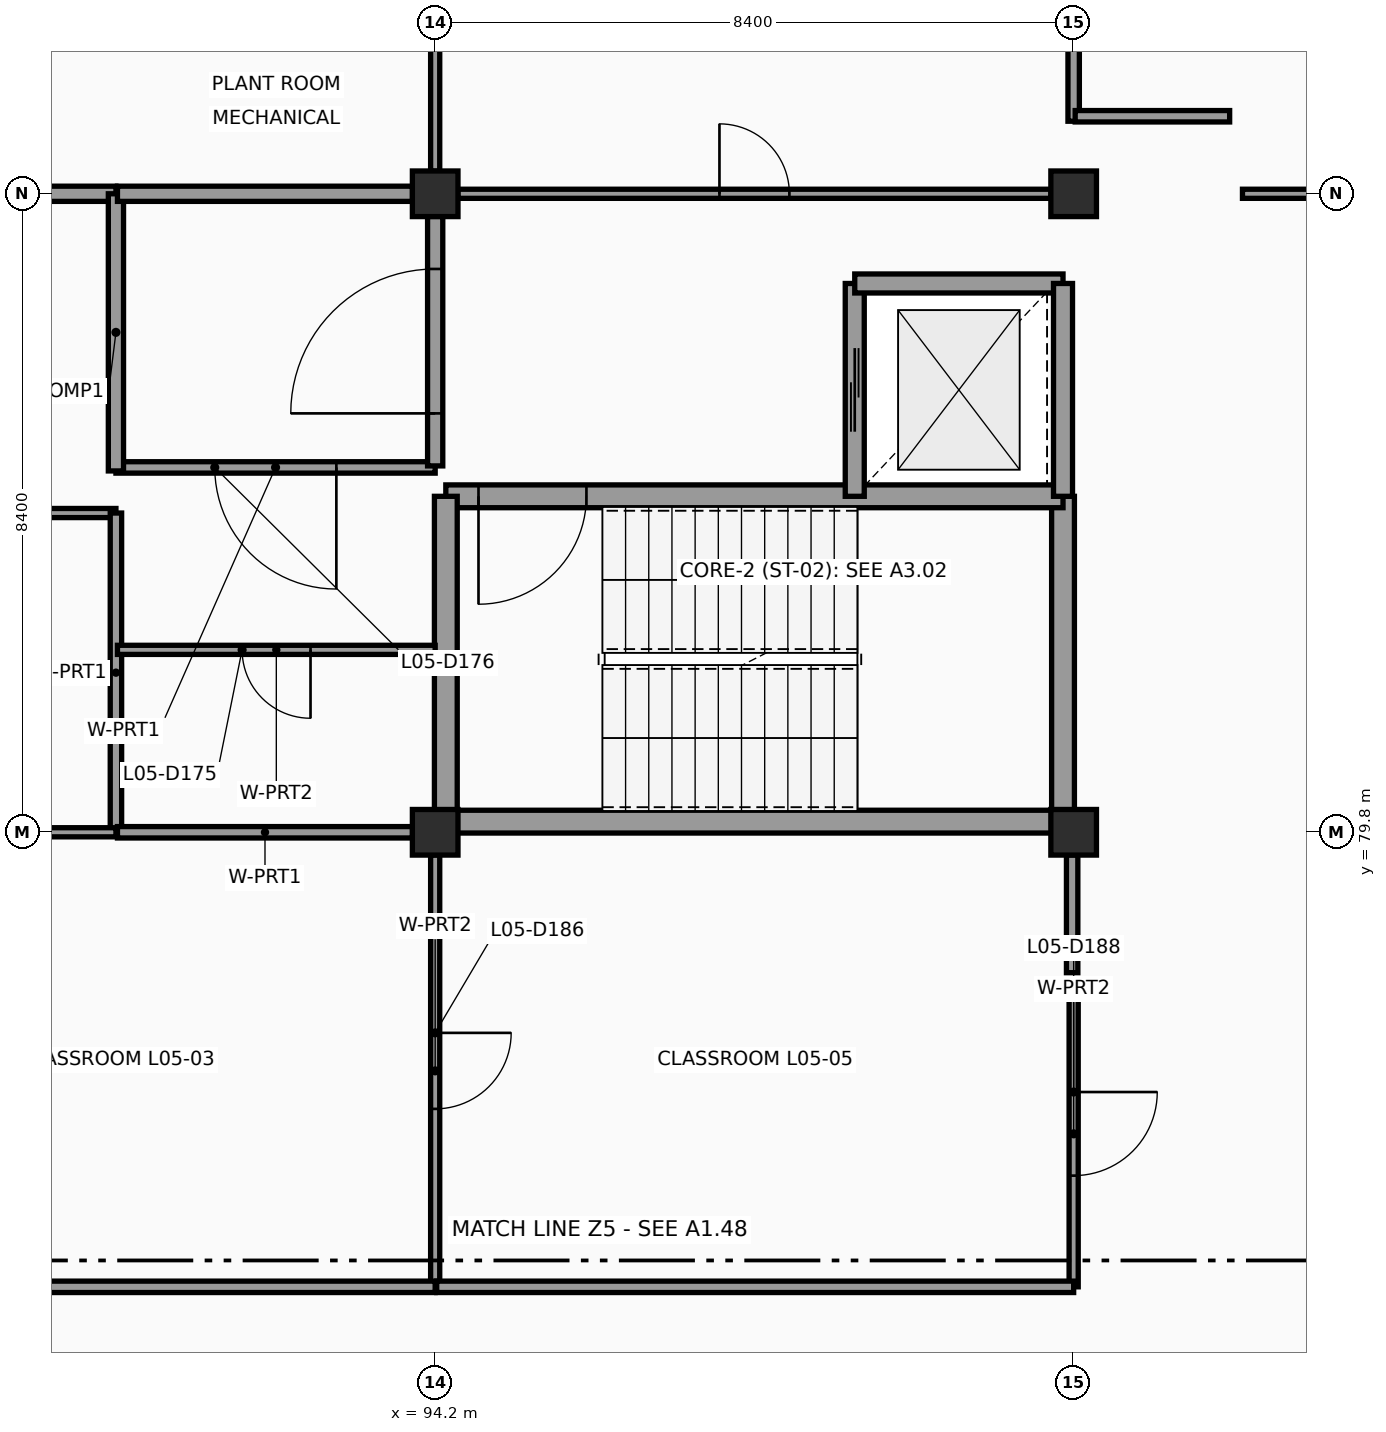
"""IFC4 building model, lengths in metres.
Left out: names, types, materials, properties, quantities, classifications, styles, units other than length and angle.
Written with IfcOpenShell. Run it as: python <this file> out.ifc"""

import sys

from ifc_helpers import new_model, si_unit, direction, frame, frame_2d, origin, origin_2d, place, context, subcontext, project, spatial, rectangle, extrude, element, fill, save


model = new_model("IFC4")
c1 = context("Model", 3, precision=1e-05, world=origin(), true_north=direction((0.0, 1.0)))
c2 = subcontext(c1, "Body", "Model", "MODEL_VIEW")
j1 = project(units=[si_unit("LENGTHUNIT", "METRE"), si_unit("PLANEANGLEUNIT", "RADIAN")], contexts=[c1])
p1 = place(None, origin())
s1 = spatial("IfcSite", under=j1, at=p1, CompositionType="ELEMENT")
p2 = place(p1, origin())
s2 = spatial("IfcBuilding", under=s1, at=p2, CompositionType="ELEMENT")
p3 = place(p2, frame((0.0, 0.0, 18.6)))
s3 = spatial("IfcBuildingStorey", under=s2, at=p3, CompositionType="ELEMENT", Elevation=18.6)
for number, where, z_axis, x_axis in (
    (1, (94.2, 79.8, 0.0), (0.0, 0.0, 1.0), (1.0, 0.0, 0.0)),
    (2, (94.2, 88.2, 0.0), (0.0, 0.0, 1.0), (1.0, 0.0, 0.0)),
    (3, (102.6, 79.8, 0.0), (0.0, 0.0, 1.0), (1.0, 0.0, 0.0)),
    (4, (102.6, 88.2, 0.0), (0.0, 0.0, 1.0), (1.0, 0.0, 0.0)),
):
    element("IfcColumn", number, at=place(p3, frame(where, z_axis=z_axis, x_axis=x_axis)), inside=s3, PredefinedType="COLUMN", context=c2, shape_type="SweptSolid", body=[
        extrude(rectangle(XDim=0.6, YDim=0.6, at=origin_2d()), origin(), (0.0, 0.0, 1.0), 3.6),
    ])
p4 = place(p3, frame((94.34, 79.94, 0.0), z_axis=(0.0, 0.0, 1.0), x_axis=(1.0, 0.0, 0.0)))
e5 = element("IfcWall", 5, at=p4, inside=s3, PredefinedType="SHEAR", context=c2, shape_type="SweptSolid", body=[
    extrude(rectangle(XDim=8.12, YDim=0.3, at=frame_2d((4.06, 0.0))), origin(), (0.0, 0.0, 1.0), 3.6),
])
p5 = place(p3, frame((102.46, 79.94, 0.0), z_axis=(0.0, 0.0, 1.0), x_axis=(0.0, 1.0, 0.0)))
e6 = element("IfcWall", 6, at=p5, inside=s3, PredefinedType="SHEAR", context=c2, shape_type="SweptSolid", body=[
    extrude(rectangle(XDim=4.28, YDim=0.3, at=frame_2d((2.14, 0.0))), origin(), (0.0, 0.0, 1.0), 3.6),
])
p6 = place(p3, frame((102.46, 84.22, 0.0), z_axis=(0.0, 0.0, 1.0), x_axis=(-1.0, 0.0, 0.0)))
e7 = element("IfcWall", 7, at=p6, inside=s3, PredefinedType="SHEAR", context=c2, shape_type="SweptSolid", body=[
    extrude(rectangle(XDim=8.12, YDim=0.3, at=frame_2d((4.06, 0.0))), origin(), (0.0, 0.0, 1.0), 3.6),
])
p7 = place(p6, frame((6.27, 0.0, 0.0)))
e8 = element("IfcOpeningElement", 8, at=p7, cuts=e7, PredefinedType="OPENING", context=c2, shape_type="SweptSolid", body=[
    extrude(rectangle(XDim=1.42, YDim=2.15, at=frame_2d((0.71, 1.075))), frame((0.0, 0.16, 0.0), z_axis=(0.0, -1.0, 0.0), x_axis=(1.0, 0.0, 0.0)), (0.0, 0.0, 1.0), 0.32),
])
p8 = place(p3, frame((94.34, 84.22, 0.0), z_axis=(0.0, 0.0, 1.0), x_axis=(0.0, -1.0, 0.0)))
e9 = element("IfcWall", 9, at=p8, inside=s3, PredefinedType="SHEAR", context=c2, shape_type="SweptSolid", body=[
    extrude(rectangle(XDim=4.28, YDim=0.3, at=frame_2d((2.14, 0.0))), origin(), (0.0, 0.0, 1.0), 3.6),
])
p9 = place(p3, frame((99.72, 87.02, 0.0), z_axis=(0.0, 0.0, 1.0), x_axis=(0.0, -1.0, 0.0)))
e10 = element("IfcWall", 10, at=p9, inside=s3, PredefinedType="SHEAR", context=c2, shape_type="SweptSolid", body=[
    extrude(rectangle(XDim=2.8, YDim=0.25, at=frame_2d((1.4, 0.0))), origin(), (0.0, 0.0, 1.0), 3.6),
])
p10 = place(p9, frame((0.85, 0.0, 0.0)))
e11 = element("IfcOpeningElement", 11, at=p10, cuts=e10, PredefinedType="OPENING", context=c2, shape_type="SweptSolid", body=[
    extrude(rectangle(XDim=1.1, YDim=2.15, at=frame_2d((0.55, 1.075))), frame((0.0, 0.135, 0.0), z_axis=(0.0, -1.0, 0.0), x_axis=(1.0, 0.0, 0.0)), (0.0, 0.0, 1.0), 0.27),
])
p11 = place(p3, frame((102.46, 87.02, 0.0), z_axis=(0.0, 0.0, 1.0), x_axis=(-1.0, 0.0, 0.0)))
e12 = element("IfcWall", 12, at=p11, inside=s3, PredefinedType="SHEAR", context=c2, shape_type="SweptSolid", body=[
    extrude(rectangle(XDim=2.74, YDim=0.25, at=frame_2d((1.37, 0.0))), origin(), (0.0, 0.0, 1.0), 3.6),
])
p12 = place(p3, frame((102.46, 84.22, 0.0), z_axis=(0.0, 0.0, 1.0), x_axis=(0.0, 1.0, 0.0)))
e13 = element("IfcWall", 13, at=p12, inside=s3, PredefinedType="SHEAR", context=c2, shape_type="SweptSolid", body=[
    extrude(rectangle(XDim=2.8, YDim=0.25, at=frame_2d((1.4, 0.0))), origin(), (0.0, 0.0, 1.0), 3.6),
])
p13 = place(p3, frame((85.8, 84.0, 0.0), z_axis=(0.0, 0.0, 1.0), x_axis=(1.0, 0.0, 0.0)))
e14 = element("IfcWall", 14, at=p13, inside=s3, PredefinedType="PARTITIONING", context=c2, shape_type="SweptSolid", body=[
    extrude(rectangle(XDim=4.2, YDim=0.12, at=frame_2d((2.1, 0.0))), origin(), (0.0, 0.0, 1.0), 2.95),
])
p14 = place(p13, frame((1.65, 0.0, 0.0)))
e15 = element("IfcOpeningElement", 15, at=p14, cuts=e14, PredefinedType="OPENING", context=c2, shape_type="SweptSolid", body=[
    extrude(rectangle(XDim=0.9, YDim=2.1, at=frame_2d((0.45, 1.05))), frame((0.0, 0.07, 0.0), z_axis=(0.0, -1.0, 0.0), x_axis=(1.0, 0.0, 0.0)), (0.0, 0.0, 1.0), 0.14),
])
p15 = place(p3, frame((90.0, 84.0, 0.0), z_axis=(0.0, 0.0, 1.0), x_axis=(0.0, -1.0, 0.0)))
e16 = element("IfcWall", 16, at=p15, inside=s3, PredefinedType="PARTITIONING", context=c2, shape_type="SweptSolid", body=[
    extrude(rectangle(XDim=4.2, YDim=0.15, at=frame_2d((2.1, 0.0))), origin(), (0.0, 0.0, 1.0), 2.55),
])
p16 = place(p3, frame((90.0, 79.8, 0.0), z_axis=(0.0, 0.0, 1.0), x_axis=(-1.0, 0.0, 0.0)))
e17 = element("IfcWall", 17, at=p16, inside=s3, PredefinedType="PARTITIONING", context=c2, shape_type="SweptSolid", body=[
    extrude(rectangle(XDim=3.902, YDim=0.12, at=frame_2d((1.951, 0.0))), origin(), (0.0, 0.0, 1.0), 2.55),
])
p17 = place(p3, frame((93.902, 79.8, 0.0), z_axis=(0.0, 0.0, 1.0), x_axis=(-1.0, 0.0, 0.0)))
e18 = element("IfcWall", 18, at=p17, inside=s3, PredefinedType="PARTITIONING", context=c2, shape_type="SweptSolid", body=[
    extrude(rectangle(XDim=3.882, YDim=0.15, at=frame_2d((1.941, 0.0))), origin(), (0.0, 0.0, 1.0), 2.55),
])
p18 = place(p3, frame((90.02, 82.2, 0.0), z_axis=(0.0, 0.0, 1.0), x_axis=(1.0, 0.0, 0.0)))
e19 = element("IfcWall", 19, at=p18, inside=s3, PredefinedType="PARTITIONING", context=c2, shape_type="SweptSolid", body=[
    extrude(rectangle(XDim=4.18, YDim=0.12, at=frame_2d((2.09, 0.0))), origin(), (0.0, 0.0, 1.0), 2.99),
])
p19 = place(p18, frame((1.64, 0.0, 0.0)))
e20 = element("IfcOpeningElement", 20, at=p19, cuts=e19, PredefinedType="OPENING", context=c2, shape_type="SweptSolid", body=[
    extrude(rectangle(XDim=0.9, YDim=2.1, at=frame_2d((0.45, 1.05))), frame((0.0, 0.07, 0.0), z_axis=(0.0, -1.0, 0.0), x_axis=(1.0, 0.0, 0.0)), (0.0, 0.0, 1.0), 0.14),
])
p20 = place(p3, frame((90.0, 84.6, 0.0), z_axis=(0.0, 0.0, 1.0), x_axis=(1.0, 0.0, 0.0)))
e21 = element("IfcWall", 21, at=p20, inside=s3, PredefinedType="PARTITIONING", context=c2, shape_type="SweptSolid", body=[
    extrude(rectangle(XDim=4.2, YDim=0.15, at=frame_2d((2.1, 0.0))), origin(), (0.0, 0.0, 1.0), 2.99),
])
p21 = place(p20, frame((1.3, 0.0, 0.0)))
e22 = element("IfcOpeningElement", 22, at=p21, cuts=e21, PredefinedType="OPENING", context=c2, shape_type="SweptSolid", body=[
    extrude(rectangle(XDim=1.6, YDim=2.2, at=frame_2d((0.8, 1.1))), frame((0.0, 0.085, 0.0), z_axis=(0.0, -1.0, 0.0), x_axis=(1.0, 0.0, 0.0)), (0.0, 0.0, 1.0), 0.17),
])
p22 = place(p3, frame((86.098, 88.2, 0.0), z_axis=(0.0, 0.0, 1.0), x_axis=(1.0, 0.0, 0.0)))
e23 = element("IfcWall", 23, at=p22, inside=s3, PredefinedType="PARTITIONING", context=c2, shape_type="SweptSolid", body=[
    extrude(rectangle(XDim=3.902, YDim=0.2, at=frame_2d((1.951, 0.0))), origin(), (0.0, 0.0, 1.0), 2.9),
])
p23 = place(p22, frame((1.051, 0.0, 0.0)))
e24 = element("IfcOpeningElement", 24, at=p23, cuts=e23, PredefinedType="OPENING", context=c2, shape_type="SweptSolid", body=[
    extrude(rectangle(XDim=1.8, YDim=2.25, at=frame_2d((0.9, 1.125))), frame((0.0, 0.11, 0.0), z_axis=(0.0, -1.0, 0.0), x_axis=(1.0, 0.0, 0.0)), (0.0, 0.0, 1.0), 0.22),
])
p24 = place(p3, frame((90.0, 88.2, 0.0), z_axis=(0.0, 0.0, 1.0), x_axis=(0.0, -1.0, 0.0)))
e25 = element("IfcWall", 25, at=p24, inside=s3, PredefinedType="PARTITIONING", context=c2, shape_type="SweptSolid", body=[
    extrude(rectangle(XDim=3.646, YDim=0.2, at=frame_2d((1.823, 0.0))), origin(), (0.0, 0.0, 1.0), 2.9),
])
p25 = place(p3, frame((90.02, 88.2, 0.0), z_axis=(0.0, 0.0, 1.0), x_axis=(1.0, 0.0, 0.0)))
e26 = element("IfcWall", 26, at=p25, inside=s3, PredefinedType="PARTITIONING", context=c2, shape_type="SweptSolid", body=[
    extrude(rectangle(XDim=3.882, YDim=0.2, at=frame_2d((1.941, 0.0))), origin(), (0.0, 0.0, 1.0), 2.9),
])
p26 = place(p3, frame((94.2, 87.902, 0.0), z_axis=(0.0, 0.0, 1.0), x_axis=(0.0, -1.0, 0.0)))
e27 = element("IfcWall", 27, at=p26, inside=s3, PredefinedType="PARTITIONING", context=c2, shape_type="SweptSolid", body=[
    extrude(rectangle(XDim=3.282, YDim=0.2, at=frame_2d((1.641, 0.0))), origin(), (0.0, 0.0, 1.0), 2.99),
])
p27 = place(p26, frame((0.691, 0.0, 0.0)))
e28 = element("IfcOpeningElement", 28, at=p27, cuts=e27, PredefinedType="OPENING", context=c2, shape_type="SweptSolid", body=[
    extrude(rectangle(XDim=1.9, YDim=2.3, at=frame_2d((0.95, 1.15))), frame((0.0, 0.11, 0.0), z_axis=(0.0, -1.0, 0.0), x_axis=(1.0, 0.0, 0.0)), (0.0, 0.0, 1.0), 0.22),
])
p28 = place(p3, frame((94.2, 79.502, 0.0), z_axis=(0.0, 0.0, 1.0), x_axis=(0.0, -1.0, 0.0)))
e29 = element("IfcWall", 29, at=p28, inside=s3, PredefinedType="PARTITIONING", context=c2, shape_type="SweptSolid", body=[
    extrude(rectangle(XDim=5.682, YDim=0.12, at=frame_2d((2.841, 0.0))), origin(), (0.0, 0.0, 1.0), 2.92),
])
p29 = place(p28, frame((2.341, 0.0, 0.0)))
e30 = element("IfcOpeningElement", 30, at=p29, cuts=e29, PredefinedType="OPENING", context=c2, shape_type="SweptSolid", body=[
    extrude(rectangle(XDim=1.0, YDim=2.1, at=frame_2d((0.5, 1.05))), frame((0.0, 0.07, 0.0), z_axis=(0.0, -1.0, 0.0), x_axis=(1.0, 0.0, 0.0)), (0.0, 0.0, 1.0), 0.14),
])
p30 = place(p3, frame((94.2, 73.82, 0.0), z_axis=(0.0, 0.0, 1.0), x_axis=(-1.0, 0.0, 0.0)))
e31 = element("IfcWall", 31, at=p30, inside=s3, PredefinedType="PARTITIONING", context=c2, shape_type="SweptSolid", body=[
    extrude(rectangle(XDim=8.38, YDim=0.15, at=frame_2d((4.19, 0.0))), origin(), (0.0, 0.0, 1.0), 2.88),
])
p31 = place(p3, frame((94.2, 96.302, 0.0), z_axis=(0.0, 0.0, 1.0), x_axis=(0.0, -1.0, 0.0)))
e32 = element("IfcWall", 32, at=p31, inside=s3, PredefinedType="PARTITIONING", context=c2, shape_type="SweptSolid", body=[
    extrude(rectangle(XDim=7.804, YDim=0.12, at=frame_2d((3.902, 0.0))), origin(), (0.0, 0.0, 1.0), 2.99),
])
p32 = place(p31, frame((3.412, 0.0, 0.0)))
e33 = element("IfcOpeningElement", 33, at=p32, cuts=e32, PredefinedType="OPENING", context=c2, shape_type="SweptSolid", body=[
    extrude(rectangle(XDim=0.98, YDim=2.12, at=frame_2d((0.49, 1.06))), frame((0.0, 0.07, 0.0), z_axis=(0.0, -1.0, 0.0), x_axis=(1.0, 0.0, 0.0)), (0.0, 0.0, 1.0), 0.14),
])
p33 = place(p3, frame((102.58, 79.502, 0.0), z_axis=(0.0, 0.0, 1.0), x_axis=(0.0, -1.0, 0.0)))
e34 = element("IfcWall", 34, at=p33, inside=s3, PredefinedType="PARTITIONING", context=c2, shape_type="SweptSolid", body=[
    extrude(rectangle(XDim=1.549, YDim=0.15, at=frame_2d((0.774, 0.0))), origin(), (0.0, 0.0, 1.0), 2.63),
])
p34 = place(p3, frame((102.6, 77.845, 0.0), z_axis=(0.0, 0.0, 1.0), x_axis=(0.0, -1.0, 0.0)))
e35 = element("IfcWall", 35, at=p34, inside=s3, PredefinedType="PARTITIONING", context=c2, shape_type="SweptSolid", body=[
    extrude(rectangle(XDim=4.025, YDim=0.12, at=frame_2d((2.013, 0.0))), origin(), (0.0, 0.0, 1.0), 2.63),
])
p35 = place(p34, frame((1.463, 0.0, 0.0)))
e36 = element("IfcOpeningElement", 36, at=p35, cuts=e35, PredefinedType="OPENING", context=c2, shape_type="SweptSolid", body=[
    extrude(rectangle(XDim=1.1, YDim=2.1, at=frame_2d((0.55, 1.05))), frame((0.0, 0.07, 0.0), z_axis=(0.0, -1.0, 0.0), x_axis=(1.0, 0.0, 0.0)), (0.0, 0.0, 1.0), 0.14),
])
p36 = place(p3, frame((102.6, 73.82, 0.0), z_axis=(0.0, 0.0, 1.0), x_axis=(-1.0, 0.0, 0.0)))
e37 = element("IfcWall", 37, at=p36, inside=s3, PredefinedType="PARTITIONING", context=c2, shape_type="SweptSolid", body=[
    extrude(rectangle(XDim=8.38, YDim=0.15, at=frame_2d((4.19, 0.0))), origin(), (0.0, 0.0, 1.0), 2.63),
])
p37 = place(p3, frame((102.302, 88.2, 0.0), z_axis=(0.0, 0.0, 1.0), x_axis=(-1.0, 0.0, 0.0)))
e38 = element("IfcWall", 38, at=p37, inside=s3, PredefinedType="PARTITIONING", context=c2, shape_type="SweptSolid", body=[
    extrude(rectangle(XDim=7.804, YDim=0.12, at=frame_2d((3.902, 0.0))), origin(), (0.0, 0.0, 1.0), 2.9),
])
p38 = place(p37, frame((3.442, 0.0, 0.0)))
e39 = element("IfcOpeningElement", 39, at=p38, cuts=e38, PredefinedType="OPENING", context=c2, shape_type="SweptSolid", body=[
    extrude(rectangle(XDim=0.92, YDim=2.1, at=frame_2d((0.46, 1.05))), frame((0.0, 0.07, 0.0), z_axis=(0.0, -1.0, 0.0), x_axis=(1.0, 0.0, 0.0)), (0.0, 0.0, 1.0), 0.14),
])
p39 = place(p3, frame((102.6, 96.302, 0.0), z_axis=(0.0, 0.0, 1.0), x_axis=(0.0, -1.0, 0.0)))
e40 = element("IfcWall", 40, at=p39, inside=s3, PredefinedType="PARTITIONING", context=c2, shape_type="SweptSolid", body=[
    extrude(rectangle(XDim=7.147, YDim=0.15, at=frame_2d((3.574, 0.0))), origin(), (0.0, 0.0, 1.0), 2.7),
])
p40 = place(p3, frame((109.552, 88.2, 0.0), z_axis=(0.0, 0.0, 1.0), x_axis=(-1.0, 0.0, 0.0)))
e41 = element("IfcWall", 41, at=p40, inside=s3, PredefinedType="PARTITIONING", context=c2, shape_type="SweptSolid", body=[
    extrude(rectangle(XDim=4.731, YDim=0.12, at=frame_2d((2.366, 0.0))), origin(), (0.0, 0.0, 1.0), 3.35),
])
p41 = place(p40, frame((1.666, 0.0, 0.0)))
e42 = element("IfcOpeningElement", 42, at=p41, cuts=e41, PredefinedType="OPENING", context=c2, shape_type="SweptSolid", body=[
    extrude(rectangle(XDim=1.4, YDim=2.2, at=frame_2d((0.7, 1.1))), frame((0.0, 0.07, 0.0), z_axis=(0.0, -1.0, 0.0), x_axis=(1.0, 0.0, 0.0)), (0.0, 0.0, 1.0), 0.14),
])
p42 = place(p3, frame((104.652, 89.22, 0.0), z_axis=(0.0, 0.0, 1.0), x_axis=(-1.0, 0.0, 0.0)))
e43 = element("IfcWall", 43, at=p42, inside=s3, PredefinedType="PARTITIONING", context=c2, shape_type="SweptSolid", body=[
    extrude(rectangle(XDim=2.032, YDim=0.15, at=frame_2d((1.016, 0.0))), origin(), (0.0, 0.0, 1.0), 2.7),
])
p43 = place(p7, frame((1.42, 0.0, 0.0), z_axis=(0.0, 0.0, 1.0), x_axis=(-1.0, 0.0, 0.0)))
e44 = element("IfcDoor", 44, at=p43, inside=s3, OperationType="SINGLE_SWING_RIGHT", PredefinedType="DOOR", context=c2, shape_type="SweptSolid", body=[
    extrude(rectangle(XDim=1.42, YDim=2.15, at=frame_2d((0.71, 1.075))), frame((0.0, 0.025, 0.0), z_axis=(0.0, -1.0, 0.0), x_axis=(1.0, 0.0, 0.0)), (0.0, 0.0, 1.0), 0.05),
])
fill(e8, e44)
p44 = place(p10, origin())
e45 = element("IfcDoor", 45, at=p44, inside=s3, OperationType="DOUBLE_DOOR_SLIDING", PredefinedType="DOOR", context=c2, shape_type="SweptSolid", body=[
    extrude(rectangle(XDim=1.1, YDim=2.15, at=frame_2d((0.55, 1.075))), frame((0.0, 0.025, 0.0), z_axis=(0.0, -1.0, 0.0), x_axis=(1.0, 0.0, 0.0)), (0.0, 0.0, 1.0), 0.05),
])
fill(e11, e45)
p45 = place(p19, origin())
e46 = element("IfcDoor", 46, at=p45, inside=s3, OperationType="SINGLE_SWING_RIGHT", PredefinedType="DOOR", context=c2, shape_type="SweptSolid", body=[
    extrude(rectangle(XDim=0.9, YDim=2.1, at=frame_2d((0.45, 1.05))), frame((0.0, 0.025, 0.0), z_axis=(0.0, -1.0, 0.0), x_axis=(1.0, 0.0, 0.0)), (0.0, 0.0, 1.0), 0.05),
])
fill(e20, e46)
p46 = place(p21, origin())
e47 = element("IfcDoor", 47, at=p46, inside=s3, OperationType="DOUBLE_DOOR_SINGLE_SWING", PredefinedType="DOOR", context=c2, shape_type="SweptSolid", body=[
    extrude(rectangle(XDim=1.6, YDim=2.2, at=frame_2d((0.8, 1.1))), frame((0.0, 0.025, 0.0), z_axis=(0.0, -1.0, 0.0), x_axis=(1.0, 0.0, 0.0)), (0.0, 0.0, 1.0), 0.05),
])
fill(e22, e47)
p47 = place(p27, origin())
e48 = element("IfcDoor", 48, at=p47, inside=s3, OperationType="DOUBLE_DOOR_SINGLE_SWING", PredefinedType="DOOR", context=c2, shape_type="SweptSolid", body=[
    extrude(rectangle(XDim=1.9, YDim=2.3, at=frame_2d((0.95, 1.15))), frame((0.0, 0.025, 0.0), z_axis=(0.0, -1.0, 0.0), x_axis=(1.0, 0.0, 0.0)), (0.0, 0.0, 1.0), 0.05),
])
fill(e28, e48)
p48 = place(p29, origin())
e49 = element("IfcDoor", 49, at=p48, inside=s3, OperationType="SINGLE_SWING_LEFT", PredefinedType="DOOR", context=c2, shape_type="SweptSolid", body=[
    extrude(rectangle(XDim=1.0, YDim=2.1, at=frame_2d((0.5, 1.05))), frame((0.0, 0.025, 0.0), z_axis=(0.0, -1.0, 0.0), x_axis=(1.0, 0.0, 0.0)), (0.0, 0.0, 1.0), 0.05),
])
fill(e30, e49)
p49 = place(p35, origin())
e50 = element("IfcDoor", 50, at=p49, inside=s3, OperationType="SINGLE_SWING_LEFT", PredefinedType="DOOR", context=c2, shape_type="SweptSolid", body=[
    extrude(rectangle(XDim=1.1, YDim=2.1, at=frame_2d((0.55, 1.05))), frame((0.0, 0.025, 0.0), z_axis=(0.0, -1.0, 0.0), x_axis=(1.0, 0.0, 0.0)), (0.0, 0.0, 1.0), 0.05),
])
fill(e36, e50)
p50 = place(p38, origin())
e51 = element("IfcDoor", 51, at=p50, inside=s3, OperationType="SINGLE_SWING_RIGHT", PredefinedType="DOOR", context=c2, shape_type="SweptSolid", body=[
    extrude(rectangle(XDim=0.92, YDim=2.1, at=frame_2d((0.46, 1.05))), frame((0.0, 0.025, 0.0), z_axis=(0.0, -1.0, 0.0), x_axis=(1.0, 0.0, 0.0)), (0.0, 0.0, 1.0), 0.05),
])
fill(e39, e51)
save(model, sys.argv[1])
